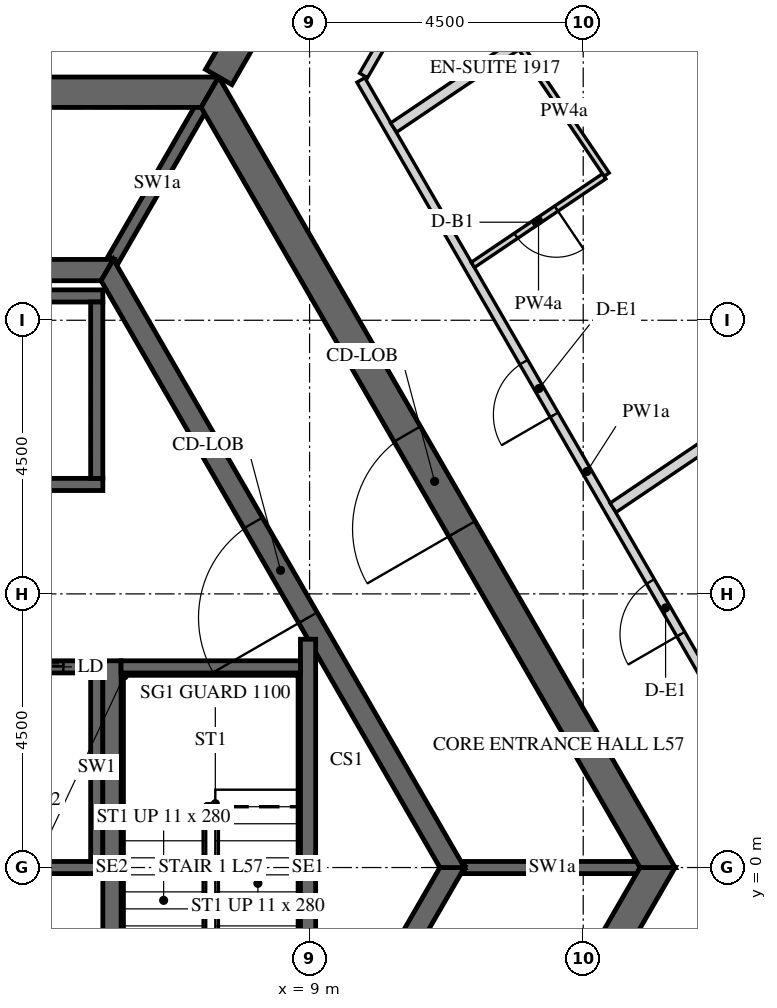
"""IFC4 building model, lengths in metres.
Left out: names, types, materials, properties, quantities, classifications, styles, units other than length and angle.
Written with IfcOpenShell. Run it as: python <this file> out.ifc"""

import sys

from ifc_helpers import new_model, si_unit, direction, frame, frame_2d, origin, place, context, subcontext, project, spatial, polyline, rectangle, outline, extrude, element, fill, save


model = new_model("IFC4")
c1 = context("Model", 3, precision=1e-05, world=origin(), true_north=direction((0.0, 1.0)))
c2 = subcontext(c1, "Body", "Model", "MODEL_VIEW")
j1 = project(units=[si_unit("LENGTHUNIT", "METRE"), si_unit("PLANEANGLEUNIT", "RADIAN")], contexts=[c1])
p1 = place(None, origin())
s1 = spatial("IfcSite", under=j1, at=p1, CompositionType="ELEMENT")
p2 = place(p1, origin())
s2 = spatial("IfcBuilding", under=s1, at=p2, CompositionType="ELEMENT")
p3 = place(p2, frame((0.0, 0.0, 238.5)))
s3 = spatial("IfcBuildingStorey", under=s2, at=p3, CompositionType="ELEMENT", Elevation=238.5)
p4 = place(p3, frame((7.361, -12.75, -0.15), z_axis=(0.0, 0.0, 1.0), x_axis=(0.50000571537, 0.866022103989, 0.0)))
e1 = element("IfcWall", 1, at=p4, inside=s3, PredefinedType="SHEAR", context=c2, shape_type="SweptSolid", body=[
    extrude(outline(polyline([(-0.144, -0.25), (14.867, -0.25), (14.578, 0.25), (0.144, 0.25), (-0.144, -0.25)])), origin(), (0.0, 0.0, 1.0), 3.9),
])
p5 = place(p4, frame((6.49, 0.0, 0.15)))
e2 = element("IfcOpeningElement", 2, at=p5, cuts=e1, PredefinedType="OPENING", context=c2, shape_type="SweptSolid", body=[
    extrude(rectangle(XDim=1.8, YDim=2.4, at=frame_2d((0.9, 1.2))), frame((0.0, 0.26, 0.0), z_axis=(0.0, -1.0, 0.0), x_axis=(1.0, 0.0, 0.0)), (0.0, 0.0, 1.0), 0.52),
])
p6 = place(p3, frame((14.722, 0.0, -0.15), z_axis=(0.0, 0.0, 1.0), x_axis=(-0.50000571537, 0.866022103989, 0.0)))
e3 = element("IfcWall", 3, at=p6, inside=s3, PredefinedType="SHEAR", context=c2, shape_type="SweptSolid", body=[
    extrude(outline(polyline([(-0.144, -0.25), (14.867, -0.25), (14.578, 0.25), (0.144, 0.25), (-0.144, -0.25)])), origin(), (0.0, 0.0, 1.0), 3.9),
])
p7 = place(p6, frame((6.432, 0.0, 0.15)))
e4 = element("IfcOpeningElement", 4, at=p7, cuts=e3, PredefinedType="OPENING", context=c2, shape_type="SweptSolid", body=[
    extrude(rectangle(XDim=1.8, YDim=2.4, at=frame_2d((0.9, 1.2))), frame((0.0, 0.26, 0.0), z_axis=(0.0, -1.0, 0.0), x_axis=(1.0, 0.0, 0.0)), (0.0, 0.0, 1.0), 0.52),
])
p8 = place(p3, frame((7.361, 12.75, -0.15), z_axis=(0.0, 0.0, 1.0), x_axis=(-1.0, 0.0, 0.0)))
e5 = element("IfcWall", 5, at=p8, inside=s3, PredefinedType="SHEAR", context=c2, shape_type="SweptSolid", body=[
    extrude(outline(polyline([(-0.144, -0.25), (14.866, -0.25), (14.578, 0.25), (0.144, 0.25), (-0.144, -0.25)])), origin(), (0.0, 0.0, 1.0), 3.9),
])
p9 = place(p8, frame((6.761, 0.0, 0.15)))
e6 = element("IfcOpeningElement", 6, at=p9, cuts=e5, PredefinedType="OPENING", context=c2, shape_type="SweptSolid", body=[
    extrude(rectangle(XDim=1.2, YDim=2.4, at=frame_2d((0.6, 1.2))), frame((0.0, 0.26, 0.0), z_axis=(0.0, -1.0, 0.0), x_axis=(1.0, 0.0, 0.0)), (0.0, 0.0, 1.0), 0.52),
])
p10 = place(p3, frame((7.506, 13.0, -0.15), z_axis=(0.0, 0.0, 1.0), x_axis=(0.499988271576, 0.866032175087, 0.0)))
e7 = element("IfcWall", 7, at=p10, inside=s3, PredefinedType="SHEAR", context=c2, shape_type="SweptSolid", body=[
    extrude(rectangle(XDim=15.424, YDim=0.5, at=frame_2d((7.712, 0.0))), origin(), (0.0, 0.0, 1.0), 3.9),
])
p11 = place(p10, frame((6.812, 0.0, 0.15)))
e8 = element("IfcOpeningElement", 8, at=p11, cuts=e7, PredefinedType="OPENING", context=c2, shape_type="SweptSolid", body=[
    extrude(rectangle(XDim=1.8, YDim=2.4, at=frame_2d((0.9, 1.2))), frame((0.0, 0.26, 0.0), z_axis=(0.0, -1.0, 0.0), x_axis=(1.0, 0.0, 0.0)), (0.0, 0.0, 1.0), 0.52),
])
p12 = place(p3, frame((5.673, -9.825, -0.15), z_axis=(0.0, 0.0, 1.0), x_axis=(0.499995046907, 0.866028263435, 0.0)))
e9 = element("IfcWall", 9, at=p12, inside=s3, PredefinedType="SHEAR", context=c2, shape_type="SweptSolid", body=[
    extrude(outline(polyline([(-0.101, -0.175), (11.446, -0.175), (11.244, 0.175), (0.101, 0.175), (-0.101, -0.175)])), origin(), (0.0, 0.0, 1.0), 3.9),
])
p13 = place(p12, frame((4.801, 0.0, 0.15)))
e10 = element("IfcOpeningElement", 10, at=p13, cuts=e9, PredefinedType="OPENING", context=c2, shape_type="SweptSolid", body=[
    extrude(rectangle(XDim=1.8, YDim=2.4, at=frame_2d((0.9, 1.2))), frame((0.0, 0.185, 0.0), z_axis=(0.0, -1.0, 0.0), x_axis=(1.0, 0.0, 0.0)), (0.0, 0.0, 1.0), 0.37),
])
p14 = place(p3, frame((11.345, 0.0, -0.15), z_axis=(0.0, 0.0, 1.0), x_axis=(-0.499995046907, 0.866028263435, 0.0)))
e11 = element("IfcWall", 11, at=p14, inside=s3, PredefinedType="SHEAR", context=c2, shape_type="SweptSolid", body=[
    extrude(outline(polyline([(-0.101, -0.175), (11.446, -0.175), (11.244, 0.175), (0.101, 0.175), (-0.101, -0.175)])), origin(), (0.0, 0.0, 1.0), 3.9),
])
p15 = place(p14, frame((4.744, 0.0, 0.15)))
e12 = element("IfcOpeningElement", 12, at=p15, cuts=e11, PredefinedType="OPENING", context=c2, shape_type="SweptSolid", body=[
    extrude(rectangle(XDim=1.8, YDim=2.4, at=frame_2d((0.9, 1.2))), frame((0.0, 0.185, 0.0), z_axis=(0.0, -1.0, 0.0), x_axis=(1.0, 0.0, 0.0)), (0.0, 0.0, 1.0), 0.37),
])
p16 = place(p3, frame((5.673, 9.825, -0.15), z_axis=(0.0, 0.0, 1.0), x_axis=(-1.0, 0.0, 0.0)))
e13 = element("IfcWall", 13, at=p16, inside=s3, PredefinedType="SHEAR", context=c2, shape_type="SweptSolid", body=[
    extrude(outline(polyline([(-0.101, -0.175), (11.446, -0.175), (11.244, 0.175), (0.101, 0.175), (-0.101, -0.175)])), origin(), (0.0, 0.0, 1.0), 3.9),
])
p17 = place(p3, frame((-5.6, 6.3, -0.25), z_axis=(0.0, 0.0, 1.0), x_axis=(1.0, 0.0, 0.0)))
e14 = element("IfcWall", 14, at=p17, inside=s3, PredefinedType="SHEAR", context=c2, shape_type="SweptSolid", body=[
    extrude(rectangle(XDim=11.2, YDim=0.2, at=frame_2d((5.6, 0.0))), origin(), (0.0, 0.0, 1.0), 3.9),
])
p18 = place(p17, frame((8.45, 0.0, 0.25)))
e15 = element("IfcOpeningElement", 15, at=p18, cuts=e14, PredefinedType="OPENING", context=c2, shape_type="SweptSolid", body=[
    extrude(rectangle(XDim=0.9, YDim=2.1, at=frame_2d((0.45, 1.05))), frame((0.0, 0.11, 0.0), z_axis=(0.0, -1.0, 0.0), x_axis=(1.0, 0.0, 0.0)), (0.0, 0.0, 1.0), 0.22),
])
p19 = place(p17, frame((0.65, 0.0, 0.25)))
e16 = element("IfcOpeningElement", 16, at=p19, cuts=e14, PredefinedType="OPENING", context=c2, shape_type="SweptSolid", body=[
    extrude(rectangle(XDim=1.1, YDim=2.1, at=frame_2d((0.55, 1.05))), frame((0.0, 0.11, 0.0), z_axis=(0.0, -1.0, 0.0), x_axis=(1.0, 0.0, 0.0)), (0.0, 0.0, 1.0), 0.22),
])
p20 = place(p17, frame((2.85, 0.0, 0.25)))
e17 = element("IfcOpeningElement", 17, at=p20, cuts=e14, PredefinedType="OPENING", context=c2, shape_type="SweptSolid", body=[
    extrude(rectangle(XDim=1.1, YDim=2.1, at=frame_2d((0.55, 1.05))), frame((0.0, 0.11, 0.0), z_axis=(0.0, -1.0, 0.0), x_axis=(1.0, 0.0, 0.0)), (0.0, 0.0, 1.0), 0.22),
])
p21 = place(p17, frame((5.05, 0.0, 0.25)))
e18 = element("IfcOpeningElement", 18, at=p21, cuts=e14, PredefinedType="OPENING", context=c2, shape_type="SweptSolid", body=[
    extrude(rectangle(XDim=1.1, YDim=2.1, at=frame_2d((0.55, 1.05))), frame((0.0, 0.11, 0.0), z_axis=(0.0, -1.0, 0.0), x_axis=(1.0, 0.0, 0.0)), (0.0, 0.0, 1.0), 0.22),
])
p22 = place(p3, frame((-5.6, 9.4, -0.25), z_axis=(0.0, 0.0, 1.0), x_axis=(1.0, 0.0, 0.0)))
e19 = element("IfcWall", 19, at=p22, inside=s3, PredefinedType="SHEAR", context=c2, shape_type="SweptSolid", body=[
    extrude(rectangle(XDim=11.2, YDim=0.2, at=frame_2d((5.6, 0.0))), origin(), (0.0, 0.0, 1.0), 3.9),
])
p23 = place(p3, frame((5.5, 6.4, -0.25), z_axis=(0.0, 0.0, 1.0), x_axis=(0.0, 1.0, 0.0)))
e20 = element("IfcWall", 20, at=p23, inside=s3, PredefinedType="SHEAR", context=c2, shape_type="SweptSolid", body=[
    extrude(rectangle(XDim=2.9, YDim=0.2, at=frame_2d((1.45, 0.0))), origin(), (0.0, 0.0, 1.0), 3.9),
])
p24 = place(p3, frame((-5.6, 3.3, -0.25), z_axis=(0.0, 0.0, 1.0), x_axis=(1.0, 0.0, 0.0)))
e21 = element("IfcWall", 21, at=p24, inside=s3, PredefinedType="SHEAR", context=c2, shape_type="SweptSolid", body=[
    extrude(rectangle(XDim=11.2, YDim=0.2, at=frame_2d((5.6, 0.0))), origin(), (0.0, 0.0, 1.0), 3.9),
])
p25 = place(p24, frame((0.65, 0.0, 0.25)))
e22 = element("IfcOpeningElement", 22, at=p25, cuts=e21, PredefinedType="OPENING", context=c2, shape_type="SweptSolid", body=[
    extrude(rectangle(XDim=1.1, YDim=2.1, at=frame_2d((0.55, 1.05))), frame((0.0, 0.11, 0.0), z_axis=(0.0, -1.0, 0.0), x_axis=(1.0, 0.0, 0.0)), (0.0, 0.0, 1.0), 0.22),
])
p26 = place(p24, frame((2.85, 0.0, 0.25)))
e23 = element("IfcOpeningElement", 23, at=p26, cuts=e21, PredefinedType="OPENING", context=c2, shape_type="SweptSolid", body=[
    extrude(rectangle(XDim=1.1, YDim=2.1, at=frame_2d((0.55, 1.05))), frame((0.0, 0.11, 0.0), z_axis=(0.0, -1.0, 0.0), x_axis=(1.0, 0.0, 0.0)), (0.0, 0.0, 1.0), 0.22),
])
p27 = place(p24, frame((5.05, 0.0, 0.25)))
e24 = element("IfcOpeningElement", 24, at=p27, cuts=e21, PredefinedType="OPENING", context=c2, shape_type="SweptSolid", body=[
    extrude(rectangle(XDim=1.1, YDim=2.1, at=frame_2d((0.55, 1.05))), frame((0.0, 0.11, 0.0), z_axis=(0.0, -1.0, 0.0), x_axis=(1.0, 0.0, 0.0)), (0.0, 0.0, 1.0), 0.22),
])
p28 = place(p24, frame((7.25, 0.0, 0.25)))
e25 = element("IfcOpeningElement", 25, at=p28, cuts=e21, PredefinedType="OPENING", context=c2, shape_type="SweptSolid", body=[
    extrude(rectangle(XDim=1.1, YDim=2.1, at=frame_2d((0.55, 1.05))), frame((0.0, 0.11, 0.0), z_axis=(0.0, -1.0, 0.0), x_axis=(1.0, 0.0, 0.0)), (0.0, 0.0, 1.0), 0.22),
])
p29 = place(p24, frame((9.45, 0.0, 0.25)))
e26 = element("IfcOpeningElement", 26, at=p29, cuts=e21, PredefinedType="OPENING", context=c2, shape_type="SweptSolid", body=[
    extrude(rectangle(XDim=1.1, YDim=2.1, at=frame_2d((0.55, 1.05))), frame((0.0, 0.11, 0.0), z_axis=(0.0, -1.0, 0.0), x_axis=(1.0, 0.0, 0.0)), (0.0, 0.0, 1.0), 0.22),
])
p30 = place(p3, frame((-5.6, 0.0, -0.25), z_axis=(0.0, 0.0, 1.0), x_axis=(1.0, 0.0, 0.0)))
e27 = element("IfcWall", 27, at=p30, inside=s3, PredefinedType="SHEAR", context=c2, shape_type="SweptSolid", body=[
    extrude(rectangle(XDim=11.2, YDim=0.2, at=frame_2d((5.6, 0.0))), origin(), (0.0, 0.0, 1.0), 3.9),
])
p31 = place(p3, frame((5.5, 0.1, -0.25), z_axis=(0.0, 0.0, 1.0), x_axis=(0.0, 1.0, 0.0)))
e28 = element("IfcWall", 28, at=p31, inside=s3, PredefinedType="SHEAR", context=c2, shape_type="SweptSolid", body=[
    extrude(rectangle(XDim=3.1, YDim=0.2, at=frame_2d((1.55, 0.0))), origin(), (0.0, 0.0, 1.0), 3.9),
])
for number, where, z_axis, x_axis in (
    (29, (11.547, 0.0, -0.15), (0.0, 0.0, 1.0), (1.0, 0.0, 0.0)),
    (30, (5.773, 10.0, -0.15), (0.0, 0.0, 1.0), (0.5, 0.866, 0.0)),
):
    element("IfcWall", number, at=place(p3, frame(where, z_axis=z_axis, x_axis=x_axis)), inside=s3, PredefinedType="SHEAR", context=c2, shape_type="SweptSolid", body=[
        extrude(rectangle(XDim=2.887, YDim=0.2, at=frame_2d((1.443, 0.0))), origin(), (0.0, 0.0, 1.0), 3.9),
    ])
p32 = place(p3, frame((5.75, -3.4, -0.25), z_axis=(0.0, 0.0, 1.0), x_axis=(0.0, 1.0, 0.0)))
e31 = element("IfcWall", 31, at=p32, inside=s3, PredefinedType="SHEAR", context=c2, shape_type="SweptSolid", body=[
    extrude(rectangle(XDim=6.8, YDim=0.3, at=frame_2d((3.4, 0.0))), origin(), (0.0, 0.0, 1.0), 3.9),
])
p33 = place(p3, frame((8.975, -3.755, -0.25), z_axis=(0.0, 0.0, 1.0), x_axis=(0.0, 1.0, 0.0)))
e32 = element("IfcWall", 32, at=p33, inside=s3, PredefinedType="SHEAR", context=c2, shape_type="SweptSolid", body=[
    extrude(rectangle(XDim=7.51, YDim=0.25, at=frame_2d((3.755, 0.0))), origin(), (0.0, 0.0, 1.0), 3.9),
])
p34 = place(p3, frame((5.9, 3.3, -0.25), z_axis=(0.0, 0.0, 1.0), x_axis=(1.0, 0.0, 0.0)))
e33 = element("IfcWall", 33, at=p34, inside=s3, PredefinedType="SHEAR", context=c2, shape_type="SweptSolid", body=[
    extrude(rectangle(XDim=2.95, YDim=0.2, at=frame_2d((1.475, 0.0))), origin(), (0.0, 0.0, 1.0), 3.9),
])
p35 = place(p3, frame((9.887, -12.875, 0.0), z_axis=(0.0, 0.0, 1.0), x_axis=(0.499998228944, 0.866026426302, 0.0)))
e34 = element("IfcWall", 34, at=p35, inside=s3, PredefinedType="PARTITIONING", context=c2, shape_type="SweptSolid", body=[
    extrude(rectangle(XDim=14.867, YDim=0.15, at=frame_2d((7.433, 0.0))), origin(), (0.0, 0.0, 1.0), 2.838),
])
p36 = place(p35, frame((3.519, 0.0, 0.0)))
e35 = element("IfcOpeningElement", 35, at=p36, cuts=e34, PredefinedType="OPENING", context=c2, shape_type="SweptSolid", body=[
    extrude(rectangle(XDim=1.0, YDim=2.1, at=frame_2d((0.5, 1.05))), frame((0.0, 0.085, 0.0), z_axis=(0.0, -1.0, 0.0), x_axis=(1.0, 0.0, 0.0)), (0.0, 0.0, 1.0), 0.17),
])
p37 = place(p35, frame((7.324, 0.0, 0.0)))
e36 = element("IfcOpeningElement", 36, at=p37, cuts=e34, PredefinedType="OPENING", context=c2, shape_type="SweptSolid", body=[
    extrude(rectangle(XDim=1.0, YDim=2.1, at=frame_2d((0.5, 1.05))), frame((0.0, 0.085, 0.0), z_axis=(0.0, -1.0, 0.0), x_axis=(1.0, 0.0, 0.0)), (0.0, 0.0, 1.0), 0.17),
])
p38 = place(p35, frame((13.717, 0.0, 0.0)))
e37 = element("IfcOpeningElement", 37, at=p38, cuts=e34, PredefinedType="OPENING", context=c2, shape_type="SweptSolid", body=[
    extrude(rectangle(XDim=1.0, YDim=2.1, at=frame_2d((0.5, 1.05))), frame((0.0, 0.085, 0.0), z_axis=(0.0, -1.0, 0.0), x_axis=(1.0, 0.0, 0.0)), (0.0, 0.0, 1.0), 0.17),
])
p39 = place(p3, frame((17.277, 0.075, 0.0), z_axis=(0.0, 0.0, 1.0), x_axis=(-0.499998228944, 0.866026426302, 0.0)))
e38 = element("IfcWall", 38, at=p39, inside=s3, PredefinedType="PARTITIONING", context=c2, shape_type="SweptSolid", body=[
    extrude(rectangle(XDim=14.867, YDim=0.15, at=frame_2d((7.433, 0.0))), origin(), (0.0, 0.0, 1.0), 2.838),
])
p40 = place(p39, frame((4.345, 0.0, 0.0)))
e39 = element("IfcOpeningElement", 39, at=p40, cuts=e38, PredefinedType="OPENING", context=c2, shape_type="SweptSolid", body=[
    extrude(rectangle(XDim=1.0, YDim=2.1, at=frame_2d((0.5, 1.05))), frame((0.0, 0.085, 0.0), z_axis=(0.0, -1.0, 0.0), x_axis=(1.0, 0.0, 0.0)), (0.0, 0.0, 1.0), 0.17),
])
p41 = place(p39, frame((8.51, 0.0, 0.0)))
e40 = element("IfcOpeningElement", 40, at=p41, cuts=e38, PredefinedType="OPENING", context=c2, shape_type="SweptSolid", body=[
    extrude(rectangle(XDim=1.0, YDim=2.1, at=frame_2d((0.5, 1.05))), frame((0.0, 0.085, 0.0), z_axis=(0.0, -1.0, 0.0), x_axis=(1.0, 0.0, 0.0)), (0.0, 0.0, 1.0), 0.17),
])
p42 = place(p3, frame((9.887, 13.025, 0.0), z_axis=(0.0, 0.0, 1.0), x_axis=(0.499985955615, 0.866033512162, 0.0)))
e41 = element("IfcWall", 41, at=p42, inside=s3, PredefinedType="PARTITIONING", context=c2, shape_type="SweptSolid", body=[
    extrude(rectangle(XDim=7.699, YDim=0.15, at=frame_2d((3.85, 0.0))), origin(), (0.0, 0.0, 1.0), 2.838),
])
p43 = place(p42, frame((2.106, 0.0, 0.0)))
e42 = element("IfcOpeningElement", 42, at=p43, cuts=e41, PredefinedType="OPENING", context=c2, shape_type="SweptSolid", body=[
    extrude(rectangle(XDim=1.0, YDim=2.1, at=frame_2d((0.5, 1.05))), frame((0.0, 0.085, 0.0), z_axis=(0.0, -1.0, 0.0), x_axis=(1.0, 0.0, 0.0)), (0.0, 0.0, 1.0), 0.17),
])
p44 = place(p3, frame((24.389, 12.931, 0.0), z_axis=(0.0, 0.0, 1.0), x_axis=(-0.829040439793, -0.559188652593, 0.0)))
e43 = element("IfcWall", 43, at=p44, inside=s3, PredefinedType="PARTITIONING", context=c2, shape_type="SweptSolid", body=[
    extrude(rectangle(XDim=12.542, YDim=0.18, at=frame_2d((6.271, 0.0))), origin(), (0.0, 0.0, 1.0), 2.838),
])
p45 = place(p3, frame((12.483, 13.476, 0.0), z_axis=(0.0, 0.0, 1.0), x_axis=(0.559203861497, -0.829030181168, 0.0)))
e44 = element("IfcWall", 44, at=p45, inside=s3, PredefinedType="PARTITIONING", context=c2, shape_type="SweptSolid", body=[
    extrude(rectangle(XDim=2.51, YDim=0.1, at=frame_2d((1.255, 0.0))), origin(), (0.0, 0.0, 1.0), 2.838),
])
p46 = place(p3, frame((13.845, 11.367, 0.0), z_axis=(0.0, 0.0, 1.0), x_axis=(-0.829068087245, -0.55914766092, 0.0)))
e45 = element("IfcWall", 45, at=p46, inside=s3, PredefinedType="PARTITIONING", context=c2, shape_type="SweptSolid", body=[
    extrude(rectangle(XDim=2.605, YDim=0.1, at=frame_2d((1.302, 0.0))), origin(), (0.0, 0.0, 1.0), 2.838),
])
p47 = place(p46, frame((0.95, 0.0, 0.0)))
e46 = element("IfcOpeningElement", 46, at=p47, cuts=e45, PredefinedType="OPENING", context=c2, shape_type="SweptSolid", body=[
    extrude(rectangle(XDim=0.8, YDim=2.1, at=frame_2d((0.4, 1.05))), frame((0.0, 0.06, 0.0), z_axis=(0.0, -1.0, 0.0), x_axis=(1.0, 0.0, 0.0)), (0.0, 0.0, 1.0), 0.12),
])
p48 = place(p3, frame((20.363, 18.9, 0.0), z_axis=(0.0, 0.0, 1.0), x_axis=(-0.829027307641, -0.559208121531, 0.0)))
e47 = element("IfcWall", 47, at=p48, inside=s3, PredefinedType="PARTITIONING", context=c2, shape_type="SweptSolid", body=[
    extrude(rectangle(XDim=12.039, YDim=0.18, at=frame_2d((6.02, 0.0))), origin(), (0.0, 0.0, 1.0), 2.838),
])
p49 = place(p7, origin())
e48 = element("IfcDoor", 48, at=p49, inside=s3, OperationType="DOUBLE_DOOR_SINGLE_SWING", PredefinedType="DOOR", context=c2, shape_type="SweptSolid", body=[
    extrude(rectangle(XDim=1.8, YDim=2.4, at=frame_2d((0.9, 1.2))), frame((0.0, 0.025, 0.0), z_axis=(0.0, -1.0, 0.0), x_axis=(1.0, 0.0, 0.0)), (0.0, 0.0, 1.0), 0.05),
])
fill(e4, e48)
p50 = place(p15, origin())
e49 = element("IfcDoor", 49, at=p50, inside=s3, OperationType="DOUBLE_DOOR_SINGLE_SWING", PredefinedType="DOOR", context=c2, shape_type="SweptSolid", body=[
    extrude(rectangle(XDim=1.8, YDim=2.4, at=frame_2d((0.9, 1.2))), frame((0.0, 0.025, 0.0), z_axis=(0.0, -1.0, 0.0), x_axis=(1.0, 0.0, 0.0)), (0.0, 0.0, 1.0), 0.05),
])
fill(e12, e49)
p51 = place(p29, origin())
e50 = element("IfcDoor", 50, at=p51, inside=s3, OperationType="SLIDING_TO_LEFT", PredefinedType="DOOR", context=c2, shape_type="SweptSolid", body=[
    extrude(rectangle(XDim=1.1, YDim=2.1, at=frame_2d((0.55, 1.05))), frame((0.0, 0.025, 0.0), z_axis=(0.0, -1.0, 0.0), x_axis=(1.0, 0.0, 0.0)), (0.0, 0.0, 1.0), 0.05),
])
fill(e26, e50)
p52 = place(p40, origin())
e51 = element("IfcDoor", 51, at=p52, inside=s3, OperationType="SINGLE_SWING_LEFT", PredefinedType="DOOR", context=c2, shape_type="SweptSolid", body=[
    extrude(rectangle(XDim=1.0, YDim=2.1, at=frame_2d((0.5, 1.05))), frame((0.0, 0.025, 0.0), z_axis=(0.0, -1.0, 0.0), x_axis=(1.0, 0.0, 0.0)), (0.0, 0.0, 1.0), 0.05),
])
fill(e39, e51)
p53 = place(p41, origin())
e52 = element("IfcDoor", 52, at=p53, inside=s3, OperationType="SINGLE_SWING_RIGHT", PredefinedType="DOOR", context=c2, shape_type="SweptSolid", body=[
    extrude(rectangle(XDim=1.0, YDim=2.1, at=frame_2d((0.5, 1.05))), frame((0.0, 0.025, 0.0), z_axis=(0.0, -1.0, 0.0), x_axis=(1.0, 0.0, 0.0)), (0.0, 0.0, 1.0), 0.05),
])
fill(e40, e52)
p54 = place(p47, origin())
e53 = element("IfcDoor", 53, at=p54, inside=s3, OperationType="SINGLE_SWING_LEFT", PredefinedType="DOOR", context=c2, shape_type="SweptSolid", body=[
    extrude(rectangle(XDim=0.8, YDim=2.1, at=frame_2d((0.4, 1.05))), frame((0.0, 0.025, 0.0), z_axis=(0.0, -1.0, 0.0), x_axis=(1.0, 0.0, 0.0)), (0.0, 0.0, 1.0), 0.05),
])
fill(e46, e53)
save(model, sys.argv[1])
